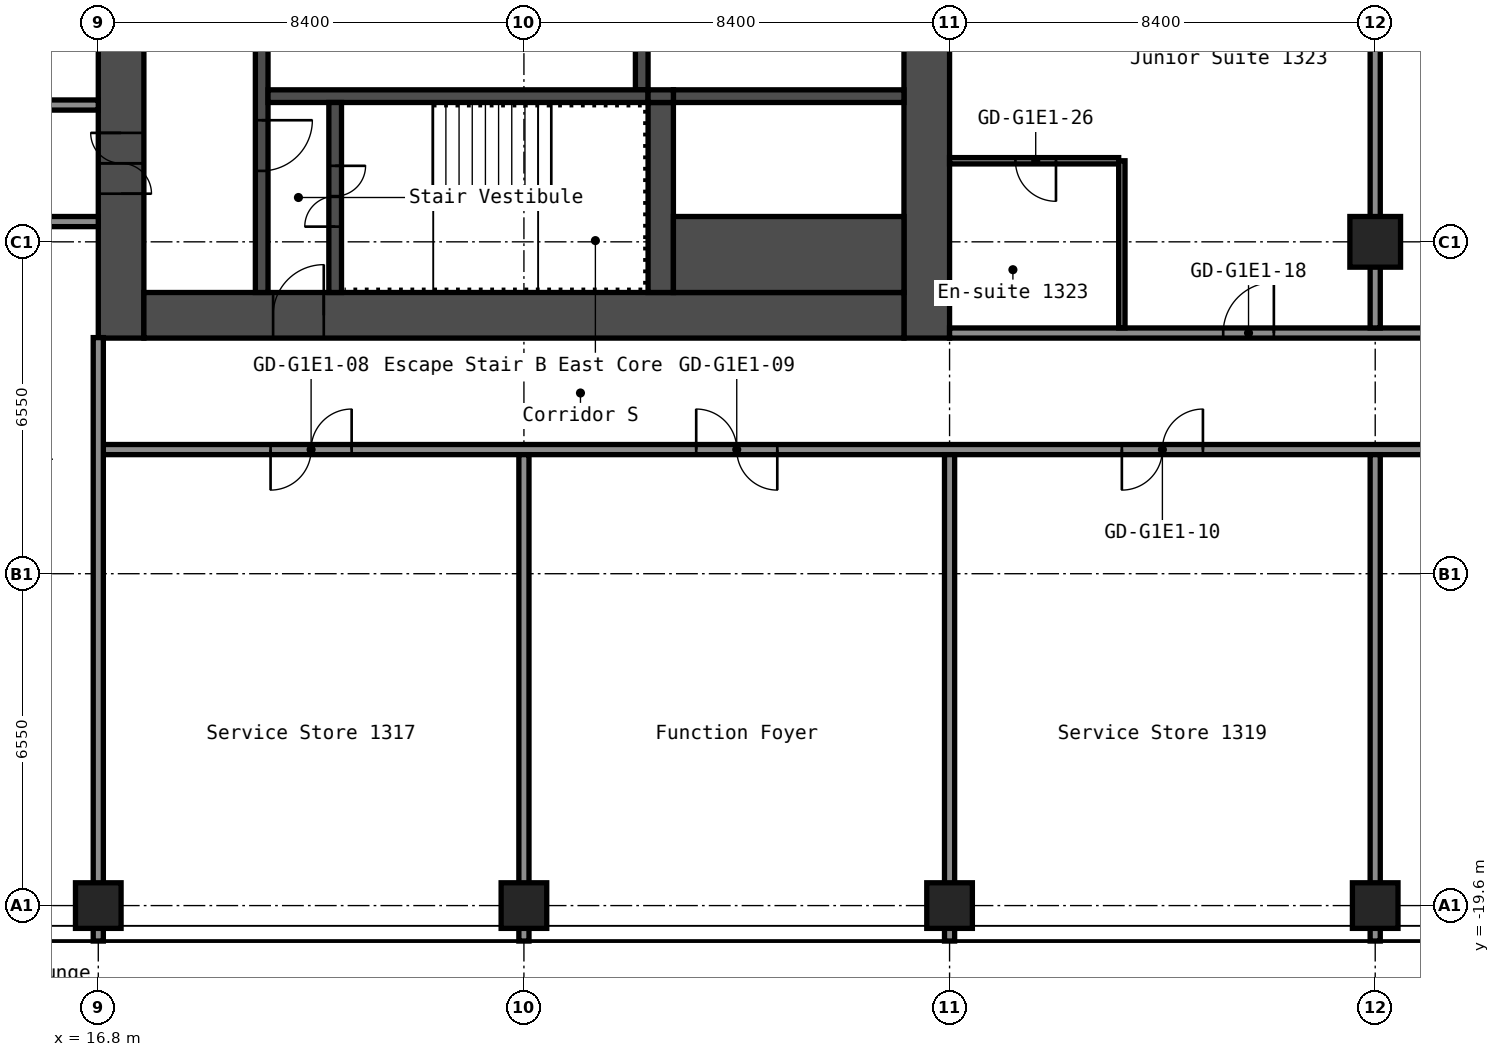
"""IFC4 building model, lengths in metres.
Left out: names, types, materials, properties, quantities, classifications, styles, units other than length and angle.
Written with IfcOpenShell. Run it as: python <this file> out.ifc"""

import sys

from ifc_helpers import new_model, si_unit, direction, frame, frame_2d, origin, origin_2d, place, context, subcontext, project, spatial, rectangle, hollow_rectangle, extrude, element, fill, save


model = new_model("IFC4")
c1 = context("Model", 3, precision=1e-05, world=origin(), true_north=direction((0.0, 1.0)))
c2 = subcontext(c1, "Body", "Model", "MODEL_VIEW")
j1 = project(units=[si_unit("LENGTHUNIT", "METRE"), si_unit("PLANEANGLEUNIT", "RADIAN")], contexts=[c1])
p1 = place(None, origin())
s1 = spatial("IfcSite", under=j1, at=p1, CompositionType="ELEMENT")
p2 = place(p1, origin())
s2 = spatial("IfcBuilding", under=s1, at=p2, CompositionType="ELEMENT")
p3 = place(p2, frame((0.0, 0.0, 48.6)))
s3 = spatial("IfcBuildingStorey", under=s2, at=p3, CompositionType="ELEMENT", Elevation=48.6)
for number, where, z_axis, x_axis in (
    (1, (16.8, -19.6, 0.0), (0.0, 0.0, 1.0), (1.0, 0.0, 0.0)),
    (2, (25.2, -19.6, 0.0), (0.0, 0.0, 1.0), (1.0, 0.0, 0.0)),
    (3, (33.6, -19.6, 0.0), (0.0, 0.0, 1.0), (1.0, 0.0, 0.0)),
    (4, (42.0, -19.6, 0.0), (0.0, 0.0, 1.0), (1.0, 0.0, 0.0)),
):
    element("IfcColumn", number, at=place(p3, frame(where, z_axis=z_axis, x_axis=x_axis)), inside=s3, PredefinedType="COLUMN", context=c2, shape_type="SweptSolid", body=[
        extrude(hollow_rectangle(XDim=0.9, YDim=0.9, WallThickness=0.036, at=origin_2d()), origin(), (0.0, 0.0, 1.0), 2.8),
    ])
p4 = place(p3, frame((42.0, -6.5, 0.0), z_axis=(0.0, 0.0, 1.0), x_axis=(1.0, 0.0, 0.0)))
e5 = element("IfcColumn", 5, at=p4, inside=s3, PredefinedType="COLUMN", context=c2, shape_type="SweptSolid", body=[
    extrude(hollow_rectangle(XDim=1.0, YDim=1.0, WallThickness=0.04, at=origin_2d()), origin(), (0.0, 0.0, 1.0), 2.8),
])
p5 = place(p3, frame((17.25, -8.4, 0.0), z_axis=(0.0, 0.0, 1.0), x_axis=(0.0, 1.0, 0.0)))
e6 = element("IfcWall", 6, at=p5, inside=s3, PredefinedType="SHEAR", context=c2, shape_type="SweptSolid", body=[
    extrude(rectangle(XDim=16.8, YDim=0.9, at=frame_2d((8.4, 0.0))), origin(), (0.0, 0.0, 1.0), 2.8),
])
p6 = place(p5, frame((12.75, 0.0, 0.0)))
e7 = element("IfcOpeningElement", 7, at=p6, cuts=e6, PredefinedType="OPENING", context=c2, shape_type="SweptSolid", body=[
    extrude(rectangle(XDim=1.2, YDim=2.1, at=frame_2d((0.6, 1.05))), frame((0.0, 0.46, 0.0), z_axis=(0.0, -1.0, 0.0), x_axis=(1.0, 0.0, 0.0)), (0.0, 0.0, 1.0), 0.92),
])
p7 = place(p5, frame((2.85, 0.0, 0.0)))
e8 = element("IfcOpeningElement", 8, at=p7, cuts=e6, PredefinedType="OPENING", context=c2, shape_type="SweptSolid", body=[
    extrude(rectangle(XDim=1.2, YDim=2.1, at=frame_2d((0.6, 1.05))), frame((0.0, 0.46, 0.0), z_axis=(0.0, -1.0, 0.0), x_axis=(1.0, 0.0, 0.0)), (0.0, 0.0, 1.0), 0.92),
])
p8 = place(p3, frame((33.15, -8.4, 0.0), z_axis=(0.0, 0.0, 1.0), x_axis=(0.0, 1.0, 0.0)))
e9 = element("IfcWall", 9, at=p8, inside=s3, PredefinedType="SHEAR", context=c2, shape_type="SweptSolid", body=[
    extrude(rectangle(XDim=16.8, YDim=0.9, at=frame_2d((8.4, 0.0))), origin(), (0.0, 0.0, 1.0), 2.8),
])
p9 = place(p3, frame((17.7, -7.95, 0.0), z_axis=(0.0, 0.0, 1.0), x_axis=(1.0, 0.0, 0.0)))
e10 = element("IfcWall", 10, at=p9, inside=s3, PredefinedType="SHEAR", context=c2, shape_type="SweptSolid", body=[
    extrude(rectangle(XDim=15.0, YDim=0.9, at=frame_2d((7.5, 0.0))), origin(), (0.0, 0.0, 1.0), 2.8),
])
p10 = place(p9, frame((2.55, 0.0, 0.0)))
e11 = element("IfcOpeningElement", 11, at=p10, cuts=e10, PredefinedType="OPENING", context=c2, shape_type="SweptSolid", body=[
    extrude(rectangle(XDim=1.0, YDim=2.1, at=frame_2d((0.5, 1.05))), frame((0.0, 0.46, 0.0), z_axis=(0.0, -1.0, 0.0), x_axis=(1.0, 0.0, 0.0)), (0.0, 0.0, 1.0), 0.92),
])
p11 = place(p3, frame((20.025, -7.5, 0.0), z_axis=(0.0, 0.0, 1.0), x_axis=(0.0, 1.0, 0.0)))
e12 = element("IfcWall", 12, at=p11, inside=s3, PredefinedType="SHEAR", context=c2, shape_type="SweptSolid", body=[
    extrude(rectangle(XDim=6.3, YDim=0.25, at=frame_2d((3.15, 0.0))), origin(), (0.0, 0.0, 1.0), 2.8),
])
p12 = place(p11, frame((2.4, 0.0, 0.0)))
e13 = element("IfcOpeningElement", 13, at=p12, cuts=e12, PredefinedType="OPENING", context=c2, shape_type="SweptSolid", body=[
    extrude(rectangle(XDim=1.0, YDim=2.1, at=frame_2d((0.5, 1.05))), frame((0.0, 0.135, 0.0), z_axis=(0.0, -1.0, 0.0), x_axis=(1.0, 0.0, 0.0)), (0.0, 0.0, 1.0), 0.27),
])
p13 = place(p3, frame((27.525, -3.5, 0.0), z_axis=(0.0, 0.0, 1.0), x_axis=(0.0, 1.0, 0.0)))
e14 = element("IfcWall", 14, at=p13, inside=s3, PredefinedType="SHEAR", context=c2, shape_type="SweptSolid", body=[
    extrude(rectangle(XDim=2.05, YDim=0.25, at=frame_2d((1.025, 0.0))), origin(), (0.0, 0.0, 1.0), 2.8),
])
p14 = place(p3, frame((20.15, -3.625, 0.0), z_axis=(0.0, 0.0, 1.0), x_axis=(1.0, 0.0, 0.0)))
e15 = element("IfcWall", 15, at=p14, inside=s3, PredefinedType="SHEAR", context=c2, shape_type="SweptSolid", body=[
    extrude(rectangle(XDim=7.5, YDim=0.25, at=frame_2d((3.75, 0.0))), origin(), (0.0, 0.0, 1.0), 2.8),
])
p15 = place(p3, frame((21.475, -7.5, 0.0), z_axis=(0.0, 0.0, 1.0), x_axis=(0.0, 1.0, 0.0)))
e16 = element("IfcWall", 16, at=p15, inside=s3, PredefinedType="SHEAR", context=c2, shape_type="SweptSolid", body=[
    extrude(rectangle(XDim=3.75, YDim=0.25, at=frame_2d((1.875, 0.0))), origin(), (0.0, 0.0, 1.0), 2.8),
])
p16 = place(p15, frame((1.3, 0.0, 0.0)))
e17 = element("IfcOpeningElement", 17, at=p16, cuts=e16, PredefinedType="OPENING", context=c2, shape_type="SweptSolid", body=[
    extrude(rectangle(XDim=1.2, YDim=2.1, at=frame_2d((0.6, 1.05))), frame((0.0, 0.135, 0.0), z_axis=(0.0, -1.0, 0.0), x_axis=(1.0, 0.0, 0.0)), (0.0, 0.0, 1.0), 0.27),
])
p17 = place(p3, frame((27.9, -7.5, 0.0), z_axis=(0.0, 0.0, 1.0), x_axis=(0.0, 1.0, 0.0)))
e18 = element("IfcWall", 18, at=p17, inside=s3, PredefinedType="SHEAR", context=c2, shape_type="SweptSolid", body=[
    extrude(rectangle(XDim=3.75, YDim=0.5, at=frame_2d((1.875, 0.0))), origin(), (0.0, 0.0, 1.0), 2.8),
])
p18 = place(p3, frame((28.15, -3.625, 0.0), z_axis=(0.0, 0.0, 1.0), x_axis=(1.0, 0.0, 0.0)))
e19 = element("IfcWall", 19, at=p18, inside=s3, PredefinedType="SHEAR", context=c2, shape_type="SweptSolid", body=[
    extrude(rectangle(XDim=4.55, YDim=0.25, at=frame_2d((2.275, 0.0))), origin(), (0.0, 0.0, 1.0), 2.8),
])
p19 = place(p3, frame((28.15, -6.75, 0.0), z_axis=(0.0, 0.0, 1.0), x_axis=(1.0, 0.0, 0.0)))
e20 = element("IfcWall", 20, at=p19, inside=s3, PredefinedType="SHEAR", context=c2, shape_type="SweptSolid", body=[
    extrude(rectangle(XDim=4.55, YDim=1.5, at=frame_2d((2.275, 0.0))), origin(), (0.0, 0.0, 1.0), 2.8),
])
p20 = place(p3, frame((27.65, -3.625, 0.0), z_axis=(0.0, 0.0, 1.0), x_axis=(1.0, 0.0, 0.0)))
e21 = element("IfcWall", 21, at=p20, inside=s3, PredefinedType="SHEAR", context=c2, shape_type="SweptSolid", body=[
    extrude(rectangle(XDim=0.5, YDim=0.25, at=frame_2d((0.25, 0.0))), origin(), (0.0, 0.0, 1.0), 2.8),
])
p21 = place(p3, frame((16.8, -10.6, 0.0), z_axis=(0.0, 0.0, 1.0), x_axis=(1.0, 0.0, 0.0)))
e22 = element("IfcWall", 22, at=p21, inside=s3, PredefinedType="PARTITIONING", context=c2, shape_type="SweptSolid", body=[
    extrude(rectangle(XDim=34.3, YDim=0.2, at=frame_2d((17.15, 0.0))), origin(), (0.0, 0.0, 1.0), 2.8),
])
p22 = place(p21, frame((3.4, 0.0, 0.0)))
e23 = element("IfcOpeningElement", 23, at=p22, cuts=e22, PredefinedType="OPENING", context=c2, shape_type="SweptSolid", body=[
    extrude(rectangle(XDim=1.6, YDim=2.1, at=frame_2d((0.8, 1.05))), frame((0.0, 0.11, 0.0), z_axis=(0.0, -1.0, 0.0), x_axis=(1.0, 0.0, 0.0)), (0.0, 0.0, 1.0), 0.22),
])
p23 = place(p21, frame((11.8, 0.0, 0.0)))
e24 = element("IfcOpeningElement", 24, at=p23, cuts=e22, PredefinedType="OPENING", context=c2, shape_type="SweptSolid", body=[
    extrude(rectangle(XDim=1.6, YDim=2.1, at=frame_2d((0.8, 1.05))), frame((0.0, 0.11, 0.0), z_axis=(0.0, -1.0, 0.0), x_axis=(1.0, 0.0, 0.0)), (0.0, 0.0, 1.0), 0.22),
])
p24 = place(p21, frame((20.2, 0.0, 0.0)))
e25 = element("IfcOpeningElement", 25, at=p24, cuts=e22, PredefinedType="OPENING", context=c2, shape_type="SweptSolid", body=[
    extrude(rectangle(XDim=1.6, YDim=2.1, at=frame_2d((0.8, 1.05))), frame((0.0, 0.11, 0.0), z_axis=(0.0, -1.0, 0.0), x_axis=(1.0, 0.0, 0.0)), (0.0, 0.0, 1.0), 0.22),
])
p25 = place(p21, frame((28.8, 0.0, 0.0)))
e26 = element("IfcOpeningElement", 26, at=p25, cuts=e22, PredefinedType="OPENING", context=c2, shape_type="SweptSolid", body=[
    extrude(rectangle(XDim=1.6, YDim=2.1, at=frame_2d((0.8, 1.05))), frame((0.0, 0.11, 0.0), z_axis=(0.0, -1.0, 0.0), x_axis=(1.0, 0.0, 0.0)), (0.0, 0.0, 1.0), 0.22),
])
p26 = place(p3, frame((33.6, -8.3, 0.0), z_axis=(0.0, 0.0, 1.0), x_axis=(1.0, 0.0, 0.0)))
e27 = element("IfcWall", 27, at=p26, inside=s3, PredefinedType="PARTITIONING", context=c2, shape_type="SweptSolid", body=[
    extrude(rectangle(XDim=15.0, YDim=0.2, at=frame_2d((7.5, 0.0))), origin(), (0.0, 0.0, 1.0), 2.8),
])
p27 = place(p26, frame((5.4, 0.0, 0.0)))
e28 = element("IfcOpeningElement", 28, at=p27, cuts=e27, PredefinedType="OPENING", context=c2, shape_type="SweptSolid", body=[
    extrude(rectangle(XDim=1.0, YDim=2.1, at=frame_2d((0.5, 1.05))), frame((0.0, 0.11, 0.0), z_axis=(0.0, -1.0, 0.0), x_axis=(1.0, 0.0, 0.0)), (0.0, 0.0, 1.0), 0.22),
])
p28 = place(p26, frame((9.95, 0.0, 0.0)))
e29 = element("IfcOpeningElement", 29, at=p28, cuts=e27, PredefinedType="OPENING", context=c2, shape_type="SweptSolid", body=[
    extrude(rectangle(XDim=1.0, YDim=2.1, at=frame_2d((0.5, 1.05))), frame((0.0, 0.11, 0.0), z_axis=(0.0, -1.0, 0.0), x_axis=(1.0, 0.0, 0.0)), (0.0, 0.0, 1.0), 0.22),
])
p29 = place(p3, frame((-16.8, -6.1, 0.0), z_axis=(0.0, 0.0, 1.0), x_axis=(1.0, 0.0, 0.0)))
e30 = element("IfcWall", 30, at=p29, inside=s3, PredefinedType="PARTITIONING", context=c2, shape_type="SweptSolid", body=[
    extrude(rectangle(XDim=33.6, YDim=0.2, at=frame_2d((16.8, 0.0))), origin(), (0.0, 0.0, 1.0), 2.8),
])
p30 = place(p29, frame((5.8, 0.0, 0.0)))
e31 = element("IfcOpeningElement", 31, at=p30, cuts=e30, PredefinedType="OPENING", context=c2, shape_type="SweptSolid", body=[
    extrude(rectangle(XDim=1.0, YDim=2.1, at=frame_2d((0.5, 1.05))), frame((0.0, 0.11, 0.0), z_axis=(0.0, -1.0, 0.0), x_axis=(1.0, 0.0, 0.0)), (0.0, 0.0, 1.0), 0.22),
])
p31 = place(p29, frame((10.0, 0.0, 0.0)))
e32 = element("IfcOpeningElement", 32, at=p31, cuts=e30, PredefinedType="OPENING", context=c2, shape_type="SweptSolid", body=[
    extrude(rectangle(XDim=1.0, YDim=2.1, at=frame_2d((0.5, 1.05))), frame((0.0, 0.11, 0.0), z_axis=(0.0, -1.0, 0.0), x_axis=(1.0, 0.0, 0.0)), (0.0, 0.0, 1.0), 0.22),
])
p32 = place(p29, frame((22.6, 0.0, 0.0)))
e33 = element("IfcOpeningElement", 33, at=p32, cuts=e30, PredefinedType="OPENING", context=c2, shape_type="SweptSolid", body=[
    extrude(rectangle(XDim=1.0, YDim=2.1, at=frame_2d((0.5, 1.05))), frame((0.0, 0.11, 0.0), z_axis=(0.0, -1.0, 0.0), x_axis=(1.0, 0.0, 0.0)), (0.0, 0.0, 1.0), 0.22),
])
p33 = place(p29, frame((31.0, 0.0, 0.0)))
e34 = element("IfcOpeningElement", 34, at=p33, cuts=e30, PredefinedType="OPENING", context=c2, shape_type="SweptSolid", body=[
    extrude(rectangle(XDim=1.0, YDim=2.1, at=frame_2d((0.5, 1.05))), frame((0.0, 0.11, 0.0), z_axis=(0.0, -1.0, 0.0), x_axis=(1.0, 0.0, 0.0)), (0.0, 0.0, 1.0), 0.22),
])
p34 = place(p3, frame((33.6, -4.9, 0.0), z_axis=(0.0, 0.0, 1.0), x_axis=(1.0, 0.0, 0.0)))
e35 = element("IfcWall", 35, at=p34, inside=s3, PredefinedType="PARTITIONING", context=c2, shape_type="SweptSolid", body=[
    extrude(rectangle(XDim=3.337, YDim=0.125, at=frame_2d((1.669, 0.0))), origin(), (0.0, 0.0, 1.0), 2.8),
])
p35 = place(p34, frame((1.3, 0.0, 0.0)))
e36 = element("IfcOpeningElement", 36, at=p35, cuts=e35, PredefinedType="OPENING", context=c2, shape_type="SweptSolid", body=[
    extrude(rectangle(XDim=0.8, YDim=2.1, at=frame_2d((0.4, 1.05))), frame((0.0, 0.073, 0.0), z_axis=(0.0, -1.0, 0.0), x_axis=(1.0, 0.0, 0.0)), (0.0, 0.0, 1.0), 0.145),
])
p36 = place(p3, frame((-16.8, -3.8, 0.0), z_axis=(0.0, 0.0, 1.0), x_axis=(1.0, 0.0, 0.0)))
e37 = element("IfcWall", 37, at=p36, inside=s3, PredefinedType="PARTITIONING", context=c2, shape_type="SweptSolid", body=[
    extrude(rectangle(XDim=33.6, YDim=0.2, at=frame_2d((16.8, 0.0))), origin(), (0.0, 0.0, 1.0), 2.8),
])
p37 = place(p36, frame((10.47, 0.0, 0.0)))
e38 = element("IfcOpeningElement", 38, at=p37, cuts=e37, PredefinedType="OPENING", context=c2, shape_type="SweptSolid", body=[
    extrude(rectangle(XDim=0.9, YDim=2.1, at=frame_2d((0.45, 1.05))), frame((0.0, 0.11, 0.0), z_axis=(0.0, -1.0, 0.0), x_axis=(1.0, 0.0, 0.0)), (0.0, 0.0, 1.0), 0.22),
])
p38 = place(p36, frame((14.67, 0.0, 0.0)))
e39 = element("IfcOpeningElement", 39, at=p38, cuts=e37, PredefinedType="OPENING", context=c2, shape_type="SweptSolid", body=[
    extrude(rectangle(XDim=0.9, YDim=2.1, at=frame_2d((0.45, 1.05))), frame((0.0, 0.11, 0.0), z_axis=(0.0, -1.0, 0.0), x_axis=(1.0, 0.0, 0.0)), (0.0, 0.0, 1.0), 0.22),
])
p39 = place(p36, frame((26.26, 0.0, 0.0)))
e40 = element("IfcOpeningElement", 40, at=p39, cuts=e37, PredefinedType="OPENING", context=c2, shape_type="SweptSolid", body=[
    extrude(rectangle(XDim=0.9, YDim=2.1, at=frame_2d((0.45, 1.05))), frame((0.0, 0.11, 0.0), z_axis=(0.0, -1.0, 0.0), x_axis=(1.0, 0.0, 0.0)), (0.0, 0.0, 1.0), 0.22),
])
p40 = place(p36, frame((30.46, 0.0, 0.0)))
e41 = element("IfcOpeningElement", 41, at=p40, cuts=e37, PredefinedType="OPENING", context=c2, shape_type="SweptSolid", body=[
    extrude(rectangle(XDim=0.9, YDim=2.1, at=frame_2d((0.45, 1.05))), frame((0.0, 0.11, 0.0), z_axis=(0.0, -1.0, 0.0), x_axis=(1.0, 0.0, 0.0)), (0.0, 0.0, 1.0), 0.22),
])
p41 = place(p3, frame((16.8, -20.3, 0.0), z_axis=(0.0, 0.0, 1.0), x_axis=(0.0, 1.0, 0.0)))
e42 = element("IfcWall", 42, at=p41, inside=s3, PredefinedType="PARTITIONING", context=c2, shape_type="SweptSolid", body=[
    extrude(rectangle(XDim=11.91, YDim=0.2, at=frame_2d((5.955, 0.0))), origin(), (0.0, 0.0, 1.0), 2.8),
])
for number, where, z_axis, x_axis in (
    (43, (25.2, -20.3, 0.0), (0.0, 0.0, 1.0), (0.0, 1.0, 0.0)),
    (44, (33.6, -20.3, 0.0), (0.0, 0.0, 1.0), (0.0, 1.0, 0.0)),
):
    element("IfcWall", number, at=place(p3, frame(where, z_axis=z_axis, x_axis=x_axis)), inside=s3, PredefinedType="PARTITIONING", context=c2, shape_type="SweptSolid", body=[
        extrude(rectangle(XDim=9.6, YDim=0.2, at=frame_2d((4.8, 0.0))), origin(), (0.0, 0.0, 1.0), 2.8),
    ])
p42 = place(p3, frame((37.0, -8.2, 0.0), z_axis=(0.0, 0.0, 1.0), x_axis=(0.0, 1.0, 0.0)))
e45 = element("IfcWall", 45, at=p42, inside=s3, PredefinedType="PARTITIONING", context=c2, shape_type="SweptSolid", body=[
    extrude(rectangle(XDim=3.3, YDim=0.125, at=frame_2d((1.65, 0.0))), origin(), (0.0, 0.0, 1.0), 2.8),
])
p43 = place(p3, frame((42.0, -20.3, 0.0), z_axis=(0.0, 0.0, 1.0), x_axis=(0.0, 1.0, 0.0)))
e46 = element("IfcWall", 46, at=p43, inside=s3, PredefinedType="PARTITIONING", context=c2, shape_type="SweptSolid", body=[
    extrude(rectangle(XDim=9.6, YDim=0.2, at=frame_2d((4.8, 0.0))), origin(), (0.0, 0.0, 1.0), 2.8),
])
p44 = place(p3, frame((42.0, -8.2, 0.0), z_axis=(0.0, 0.0, 1.0), x_axis=(0.0, 1.0, 0.0)))
e47 = element("IfcWall", 47, at=p44, inside=s3, PredefinedType="PARTITIONING", context=c2, shape_type="SweptSolid", body=[
    extrude(rectangle(XDim=16.4, YDim=0.2, at=frame_2d((8.2, 0.0))), origin(), (0.0, 0.0, 1.0), 2.8),
])
p45 = place(p7, origin())
e48 = element("IfcDoor", 48, at=p45, inside=s3, OperationType="DOUBLE_DOOR_SINGLE_SWING", PredefinedType="DOOR", context=c2, shape_type="SweptSolid", body=[
    extrude(rectangle(XDim=1.2, YDim=2.1, at=frame_2d((0.6, 1.05))), frame((0.0, 0.025, 0.0), z_axis=(0.0, -1.0, 0.0), x_axis=(1.0, 0.0, 0.0)), (0.0, 0.0, 1.0), 0.05),
])
fill(e8, e48)
p46 = place(p10, origin())
e49 = element("IfcDoor", 49, at=p46, inside=s3, OperationType="SINGLE_SWING_LEFT", PredefinedType="DOOR", context=c2, shape_type="SweptSolid", body=[
    extrude(rectangle(XDim=1.0, YDim=2.1, at=frame_2d((0.5, 1.05))), frame((0.0, 0.025, 0.0), z_axis=(0.0, -1.0, 0.0), x_axis=(1.0, 0.0, 0.0)), (0.0, 0.0, 1.0), 0.05),
])
fill(e11, e49)
p47 = place(p16, origin())
e50 = element("IfcDoor", 50, at=p47, inside=s3, OperationType="DOUBLE_DOOR_SINGLE_SWING", PredefinedType="DOOR", context=c2, shape_type="SweptSolid", body=[
    extrude(rectangle(XDim=1.2, YDim=2.1, at=frame_2d((0.6, 1.05))), frame((0.0, 0.025, 0.0), z_axis=(0.0, -1.0, 0.0), x_axis=(1.0, 0.0, 0.0)), (0.0, 0.0, 1.0), 0.05),
])
fill(e17, e50)
p48 = place(p12, origin())
e51 = element("IfcDoor", 51, at=p48, inside=s3, OperationType="SINGLE_SWING_RIGHT", PredefinedType="DOOR", context=c2, shape_type="SweptSolid", body=[
    extrude(rectangle(XDim=1.0, YDim=2.1, at=frame_2d((0.5, 1.05))), frame((0.0, 0.025, 0.0), z_axis=(0.0, -1.0, 0.0), x_axis=(1.0, 0.0, 0.0)), (0.0, 0.0, 1.0), 0.05),
])
fill(e13, e51)
p49 = place(p22, origin())
e52 = element("IfcDoor", 52, at=p49, inside=s3, OperationType="DOUBLE_DOOR_SINGLE_SWING", PredefinedType="DOOR", context=c2, shape_type="SweptSolid", body=[
    extrude(rectangle(XDim=1.6, YDim=2.1, at=frame_2d((0.8, 1.05))), frame((0.0, 0.025, 0.0), z_axis=(0.0, -1.0, 0.0), x_axis=(1.0, 0.0, 0.0)), (0.0, 0.0, 1.0), 0.05),
])
fill(e23, e52)
p50 = place(p23, origin())
e53 = element("IfcDoor", 53, at=p50, inside=s3, OperationType="DOUBLE_DOOR_SINGLE_SWING", PredefinedType="DOOR", context=c2, shape_type="SweptSolid", body=[
    extrude(rectangle(XDim=1.6, YDim=2.1, at=frame_2d((0.8, 1.05))), frame((0.0, 0.025, 0.0), z_axis=(0.0, -1.0, 0.0), x_axis=(1.0, 0.0, 0.0)), (0.0, 0.0, 1.0), 0.05),
])
fill(e24, e53)
p51 = place(p24, origin())
e54 = element("IfcDoor", 54, at=p51, inside=s3, OperationType="DOUBLE_DOOR_SINGLE_SWING", PredefinedType="DOOR", context=c2, shape_type="SweptSolid", body=[
    extrude(rectangle(XDim=1.6, YDim=2.1, at=frame_2d((0.8, 1.05))), frame((0.0, 0.025, 0.0), z_axis=(0.0, -1.0, 0.0), x_axis=(1.0, 0.0, 0.0)), (0.0, 0.0, 1.0), 0.05),
])
fill(e25, e54)
p52 = place(p27, origin())
e55 = element("IfcDoor", 55, at=p52, inside=s3, OperationType="SINGLE_SWING_LEFT", PredefinedType="DOOR", context=c2, shape_type="SweptSolid", body=[
    extrude(rectangle(XDim=1.0, YDim=2.1, at=frame_2d((0.5, 1.05))), frame((0.0, 0.025, 0.0), z_axis=(0.0, -1.0, 0.0), x_axis=(1.0, 0.0, 0.0)), (0.0, 0.0, 1.0), 0.05),
])
fill(e28, e55)
p53 = place(p35, origin())
e56 = element("IfcDoor", 56, at=p53, inside=s3, OperationType="SINGLE_SWING_RIGHT", PredefinedType="DOOR", context=c2, shape_type="SweptSolid", body=[
    extrude(rectangle(XDim=0.8, YDim=2.1, at=frame_2d((0.4, 1.05))), frame((0.0, 0.025, 0.0), z_axis=(0.0, -1.0, 0.0), x_axis=(1.0, 0.0, 0.0)), (0.0, 0.0, 1.0), 0.05),
])
fill(e36, e56)
save(model, sys.argv[1])
